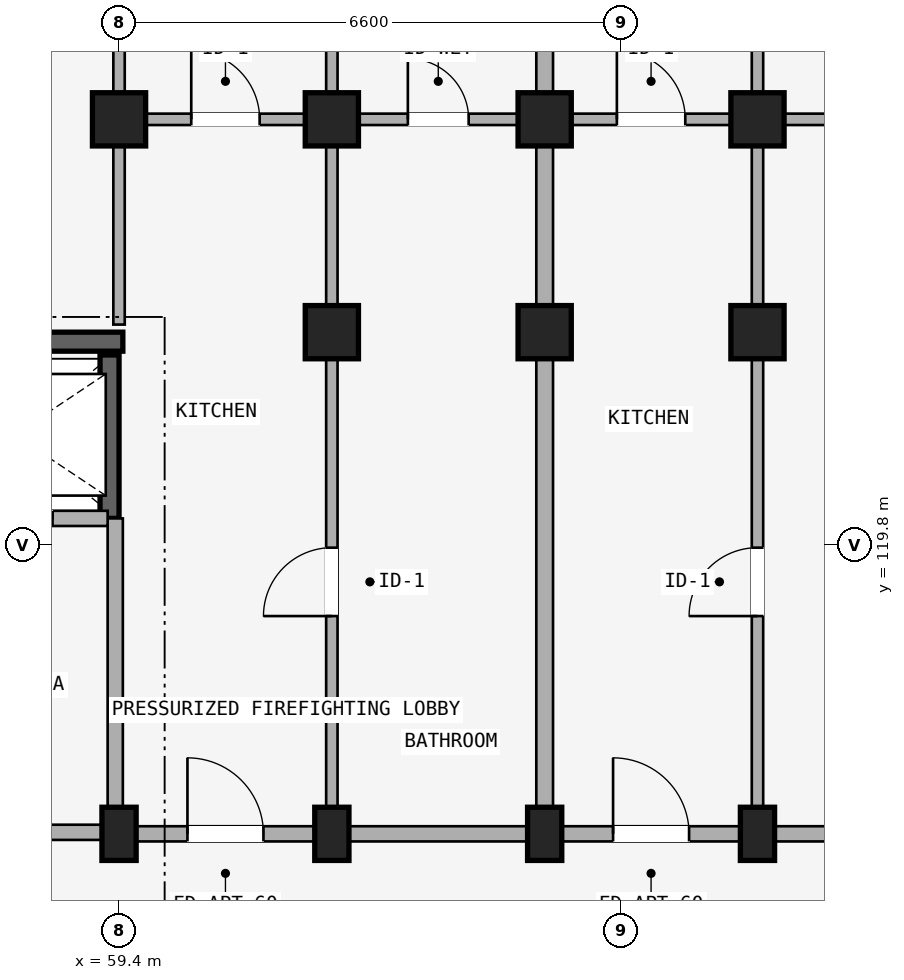
"""IFC4 building model, lengths in metres.
Left out: names, types, materials, properties, quantities, classifications, styles, units other than length and angle.
Written with IfcOpenShell. Run it as: python <this file> out.ifc"""

import sys

from ifc_helpers import new_model, si_unit, direction, frame, frame_2d, origin, origin_2d, place, context, subcontext, project, spatial, rectangle, extrude, element, fill, save


model = new_model("IFC4")
c1 = context("Model", 3, precision=1e-05, world=origin(), true_north=direction((0.0, 1.0)))
c2 = subcontext(c1, "Body", "Model", "MODEL_VIEW")
j1 = project(units=[si_unit("LENGTHUNIT", "METRE"), si_unit("PLANEANGLEUNIT", "RADIAN")], contexts=[c1])
p1 = place(None, origin())
s1 = spatial("IfcSite", under=j1, at=p1, CompositionType="ELEMENT")
p2 = place(p1, origin())
s2 = spatial("IfcBuilding", under=s1, at=p2, CompositionType="ELEMENT")
p3 = place(p2, frame((0.0, 0.0, 24.45)))
s3 = spatial("IfcBuildingStorey", under=s2, at=p3, CompositionType="ELEMENT", Elevation=24.45)
p4 = place(p3, frame((56.65, 122.475, 0.0), z_axis=(0.0, 0.0, 1.0), x_axis=(1.0, 0.0, 0.0)))
e1 = element("IfcWall", 1, at=p4, inside=s3, PredefinedType="SHEAR", context=c2, shape_type="SweptSolid", body=[
    extrude(rectangle(XDim=2.8, YDim=0.25, at=frame_2d((1.4, 0.0))), origin(), (0.0, 0.0, 1.0), 2.93),
])
p5 = place(p3, frame((59.275, 120.15, 0.0), z_axis=(0.0, 0.0, 1.0), x_axis=(0.0, 1.0, 0.0)))
e2 = element("IfcWall", 2, at=p5, inside=s3, PredefinedType="SHEAR", context=c2, shape_type="SweptSolid", body=[
    extrude(rectangle(XDim=2.15, YDim=0.25, at=frame_2d((1.075, 0.0))), origin(), (0.0, 0.0, 1.0), 2.93),
])
p6 = place(p3, frame((59.4, 116.0, 0.0), z_axis=(0.0, 0.0, 1.0), x_axis=(1.0, 0.0, 0.0)))
e3 = element("IfcColumn", 3, at=p6, inside=s3, PredefinedType="COLUMN", context=c2, shape_type="SweptSolid", body=[
    extrude(rectangle(XDim=0.45, YDim=0.7, at=origin_2d()), origin(), (0.0, 0.0, 1.0), 2.93),
])
p7 = place(p3, frame((59.4, 125.4, 0.0), z_axis=(0.0, 0.0, 1.0), x_axis=(1.0, 0.0, 0.0)))
e4 = element("IfcColumn", 4, at=p7, inside=s3, PredefinedType="COLUMN", context=c2, shape_type="SweptSolid", body=[
    extrude(rectangle(XDim=0.7, YDim=0.7, at=origin_2d()), origin(), (0.0, 0.0, 1.0), 2.93),
])
p8 = place(p3, frame((62.2, 116.0, 0.0), z_axis=(0.0, 0.0, 1.0), x_axis=(1.0, 0.0, 0.0)))
e5 = element("IfcColumn", 5, at=p8, inside=s3, PredefinedType="COLUMN", context=c2, shape_type="SweptSolid", body=[
    extrude(rectangle(XDim=0.45, YDim=0.7, at=origin_2d()), origin(), (0.0, 0.0, 1.0), 2.93),
])
for number, where, z_axis, x_axis in (
    (6, (62.2, 122.6, 0.0), (0.0, 0.0, 1.0), (1.0, 0.0, 0.0)),
    (7, (62.2, 125.4, 0.0), (0.0, 0.0, 1.0), (1.0, 0.0, 0.0)),
):
    element("IfcColumn", number, at=place(p3, frame(where, z_axis=z_axis, x_axis=x_axis)), inside=s3, PredefinedType="COLUMN", context=c2, shape_type="SweptSolid", body=[
        extrude(rectangle(XDim=0.7, YDim=0.7, at=origin_2d()), origin(), (0.0, 0.0, 1.0), 2.93),
    ])
p9 = place(p3, frame((65.0, 116.0, 0.0), z_axis=(0.0, 0.0, 1.0), x_axis=(1.0, 0.0, 0.0)))
e8 = element("IfcColumn", 8, at=p9, inside=s3, PredefinedType="COLUMN", context=c2, shape_type="SweptSolid", body=[
    extrude(rectangle(XDim=0.45, YDim=0.7, at=origin_2d()), origin(), (0.0, 0.0, 1.0), 2.93),
])
for number, where, z_axis, x_axis in (
    (9, (65.0, 122.6, 0.0), (0.0, 0.0, 1.0), (1.0, 0.0, 0.0)),
    (10, (65.0, 125.4, 0.0), (0.0, 0.0, 1.0), (1.0, 0.0, 0.0)),
):
    element("IfcColumn", number, at=place(p3, frame(where, z_axis=z_axis, x_axis=x_axis)), inside=s3, PredefinedType="COLUMN", context=c2, shape_type="SweptSolid", body=[
        extrude(rectangle(XDim=0.7, YDim=0.7, at=origin_2d()), origin(), (0.0, 0.0, 1.0), 2.93),
    ])
p10 = place(p3, frame((67.8, 116.0, 0.0), z_axis=(0.0, 0.0, 1.0), x_axis=(1.0, 0.0, 0.0)))
e11 = element("IfcColumn", 11, at=p10, inside=s3, PredefinedType="COLUMN", context=c2, shape_type="SweptSolid", body=[
    extrude(rectangle(XDim=0.45, YDim=0.7, at=origin_2d()), origin(), (0.0, 0.0, 1.0), 2.93),
])
for number, where, z_axis, x_axis in (
    (12, (67.8, 122.6, 0.0), (0.0, 0.0, 1.0), (1.0, 0.0, 0.0)),
    (13, (67.8, 125.4, 0.0), (0.0, 0.0, 1.0), (1.0, 0.0, 0.0)),
):
    element("IfcColumn", number, at=place(p3, frame(where, z_axis=z_axis, x_axis=x_axis)), inside=s3, PredefinedType="COLUMN", context=c2, shape_type="SweptSolid", body=[
        extrude(rectangle(XDim=0.7, YDim=0.7, at=origin_2d()), origin(), (0.0, 0.0, 1.0), 2.93),
    ])
p11 = place(p3, frame((53.7, 116.02, 0.0), z_axis=(0.0, 0.0, 1.0), x_axis=(1.0, 0.0, 0.0)))
e14 = element("IfcWall", 14, at=p11, inside=s3, PredefinedType="STANDARD", context=c2, shape_type="SweptSolid", body=[
    extrude(rectangle(XDim=5.65, YDim=0.2, at=frame_2d((2.825, 0.0))), origin(), (0.0, 0.0, 1.0), 2.372),
])
p12 = place(p11, frame((1.923, 0.0, 0.0)))
e15 = element("IfcOpeningElement", 15, at=p12, cuts=e14, PredefinedType="OPENING", context=c2, shape_type="SweptSolid", body=[
    extrude(rectangle(XDim=1.24, YDim=2.15, at=frame_2d((0.62, 1.075))), frame((0.0, 0.11, 0.0), z_axis=(0.0, -1.0, 0.0), x_axis=(1.0, 0.0, 0.0)), (0.0, 0.0, 1.0), 0.22),
])
p13 = place(p3, frame((59.35, 116.02, 0.0), z_axis=(0.0, 0.0, 1.0), x_axis=(0.0, 1.0, 0.0)))
e16 = element("IfcWall", 16, at=p13, inside=s3, PredefinedType="STANDARD", context=c2, shape_type="SweptSolid", body=[
    extrude(rectangle(XDim=4.13, YDim=0.2, at=frame_2d((2.065, 0.0))), origin(), (0.0, 0.0, 1.0), 2.372),
])
p14 = place(p3, frame((56.7, 120.15, 0.0), z_axis=(0.0, 0.0, 1.0), x_axis=(1.0, 0.0, 0.0)))
e17 = element("IfcWall", 17, at=p14, inside=s3, PredefinedType="STANDARD", context=c2, shape_type="SweptSolid", body=[
    extrude(rectangle(XDim=2.55, YDim=0.2, at=frame_2d((1.275, 0.0))), origin(), (0.0, 0.0, 1.0), 2.372),
])
p15 = place(p14, frame((0.725, 0.0, 0.0)))
e18 = element("IfcOpeningElement", 18, at=p15, cuts=e17, PredefinedType="OPENING", context=c2, shape_type="SweptSolid", body=[
    extrude(rectangle(XDim=1.1, YDim=2.15, at=frame_2d((0.55, 1.075))), frame((0.0, 0.11, 0.0), z_axis=(0.0, -1.0, 0.0), x_axis=(1.0, 0.0, 0.0)), (0.0, 0.0, 1.0), 0.22),
])
p16 = place(p3, frame((59.4, 116.0, 0.0), z_axis=(0.0, 0.0, 1.0), x_axis=(1.0, 0.0, 0.0)))
e19 = element("IfcWall", 19, at=p16, inside=s3, PredefinedType="STANDARD", context=c2, shape_type="SweptSolid", body=[
    extrude(rectangle(XDim=2.8, YDim=0.2, at=frame_2d((1.4, 0.0))), origin(), (0.0, 0.0, 1.0), 2.372),
])
p17 = place(p16, frame((0.9, 0.0, 0.0)))
e20 = element("IfcOpeningElement", 20, at=p17, cuts=e19, PredefinedType="OPENING", context=c2, shape_type="SweptSolid", body=[
    extrude(rectangle(XDim=1.0, YDim=2.15, at=frame_2d((0.5, 1.075))), frame((0.0, 0.11, 0.0), z_axis=(0.0, -1.0, 0.0), x_axis=(1.0, 0.0, 0.0)), (0.0, 0.0, 1.0), 0.22),
])
p18 = place(p3, frame((59.48, 125.4, 0.0), z_axis=(0.0, 0.0, 1.0), x_axis=(1.0, 0.0, 0.0)))
e21 = element("IfcWall", 21, at=p18, inside=s3, PredefinedType="PLUMBINGWALL", context=c2, shape_type="SweptSolid", body=[
    extrude(rectangle(XDim=2.64, YDim=0.15, at=frame_2d((1.32, 0.0))), origin(), (0.0, 0.0, 1.0), 2.372),
])
p19 = place(p18, frame((0.87, 0.0, 0.0)))
e22 = element("IfcOpeningElement", 22, at=p19, cuts=e21, PredefinedType="OPENING", context=c2, shape_type="SweptSolid", body=[
    extrude(rectangle(XDim=0.9, YDim=2.1, at=frame_2d((0.45, 1.05))), frame((0.0, 0.085, 0.0), z_axis=(0.0, -1.0, 0.0), x_axis=(1.0, 0.0, 0.0)), (0.0, 0.0, 1.0), 0.17),
])
p20 = place(p3, frame((62.2, 116.0, 0.0), z_axis=(0.0, 0.0, 1.0), x_axis=(1.0, 0.0, 0.0)))
e23 = element("IfcWall", 23, at=p20, inside=s3, PredefinedType="STANDARD", context=c2, shape_type="SweptSolid", body=[
    extrude(rectangle(XDim=2.8, YDim=0.2, at=frame_2d((1.4, 0.0))), origin(), (0.0, 0.0, 1.0), 2.372),
])
p21 = place(p3, frame((62.28, 125.4, 0.0), z_axis=(0.0, 0.0, 1.0), x_axis=(1.0, 0.0, 0.0)))
e24 = element("IfcWall", 24, at=p21, inside=s3, PredefinedType="PLUMBINGWALL", context=c2, shape_type="SweptSolid", body=[
    extrude(rectangle(XDim=2.64, YDim=0.15, at=frame_2d((1.32, 0.0))), origin(), (0.0, 0.0, 1.0), 2.372),
])
p22 = place(p21, frame((0.92, 0.0, 0.0)))
e25 = element("IfcOpeningElement", 25, at=p22, cuts=e24, PredefinedType="OPENING", context=c2, shape_type="SweptSolid", body=[
    extrude(rectangle(XDim=0.8, YDim=2.1, at=frame_2d((0.4, 1.05))), frame((0.0, 0.085, 0.0), z_axis=(0.0, -1.0, 0.0), x_axis=(1.0, 0.0, 0.0)), (0.0, 0.0, 1.0), 0.17),
])
p23 = place(p3, frame((65.0, 116.0, 0.0), z_axis=(0.0, 0.0, 1.0), x_axis=(1.0, 0.0, 0.0)))
e26 = element("IfcWall", 26, at=p23, inside=s3, PredefinedType="STANDARD", context=c2, shape_type="SweptSolid", body=[
    extrude(rectangle(XDim=2.8, YDim=0.2, at=frame_2d((1.4, 0.0))), origin(), (0.0, 0.0, 1.0), 2.372),
])
p24 = place(p23, frame((0.9, 0.0, 0.0)))
e27 = element("IfcOpeningElement", 27, at=p24, cuts=e26, PredefinedType="OPENING", context=c2, shape_type="SweptSolid", body=[
    extrude(rectangle(XDim=1.0, YDim=2.15, at=frame_2d((0.5, 1.075))), frame((0.0, 0.11, 0.0), z_axis=(0.0, -1.0, 0.0), x_axis=(1.0, 0.0, 0.0)), (0.0, 0.0, 1.0), 0.22),
])
p25 = place(p3, frame((65.08, 125.4, 0.0), z_axis=(0.0, 0.0, 1.0), x_axis=(1.0, 0.0, 0.0)))
e28 = element("IfcWall", 28, at=p25, inside=s3, PredefinedType="PLUMBINGWALL", context=c2, shape_type="SweptSolid", body=[
    extrude(rectangle(XDim=2.64, YDim=0.15, at=frame_2d((1.32, 0.0))), origin(), (0.0, 0.0, 1.0), 2.372),
])
p26 = place(p25, frame((0.87, 0.0, 0.0)))
e29 = element("IfcOpeningElement", 29, at=p26, cuts=e28, PredefinedType="OPENING", context=c2, shape_type="SweptSolid", body=[
    extrude(rectangle(XDim=0.9, YDim=2.1, at=frame_2d((0.45, 1.05))), frame((0.0, 0.085, 0.0), z_axis=(0.0, -1.0, 0.0), x_axis=(1.0, 0.0, 0.0)), (0.0, 0.0, 1.0), 0.17),
])
p27 = place(p3, frame((67.8, 116.0, 0.0), z_axis=(0.0, 0.0, 1.0), x_axis=(1.0, 0.0, 0.0)))
e30 = element("IfcWall", 30, at=p27, inside=s3, PredefinedType="STANDARD", context=c2, shape_type="SweptSolid", body=[
    extrude(rectangle(XDim=2.8, YDim=0.2, at=frame_2d((1.4, 0.0))), origin(), (0.0, 0.0, 1.0), 2.372),
])
p28 = place(p3, frame((67.88, 125.4, 0.0), z_axis=(0.0, 0.0, 1.0), x_axis=(1.0, 0.0, 0.0)))
e31 = element("IfcWall", 31, at=p28, inside=s3, PredefinedType="PLUMBINGWALL", context=c2, shape_type="SweptSolid", body=[
    extrude(rectangle(XDim=2.64, YDim=0.15, at=frame_2d((1.32, 0.0))), origin(), (0.0, 0.0, 1.0), 2.372),
])
p29 = place(p28, frame((0.92, 0.0, 0.0)))
e32 = element("IfcOpeningElement", 32, at=p29, cuts=e31, PredefinedType="OPENING", context=c2, shape_type="SweptSolid", body=[
    extrude(rectangle(XDim=0.8, YDim=2.1, at=frame_2d((0.4, 1.05))), frame((0.0, 0.085, 0.0), z_axis=(0.0, -1.0, 0.0), x_axis=(1.0, 0.0, 0.0)), (0.0, 0.0, 1.0), 0.17),
])
p30 = place(p3, frame((59.4, 122.7, 0.0), z_axis=(0.0, 0.0, 1.0), x_axis=(0.0, 1.0, 0.0)))
e33 = element("IfcWall", 33, at=p30, inside=s3, PredefinedType="PARTITIONING", context=c2, shape_type="SweptSolid", body=[
    extrude(rectangle(XDim=10.82, YDim=0.15, at=frame_2d((5.41, 0.0))), origin(), (0.0, 0.0, 1.0), 2.372),
])
p31 = place(p30, frame((3.7, 0.0, 0.0)))
e34 = element("IfcOpeningElement", 34, at=p31, cuts=e33, PredefinedType="OPENING", context=c2, shape_type="SweptSolid", body=[
    extrude(rectangle(XDim=0.8, YDim=2.1, at=frame_2d((0.4, 1.05))), frame((0.0, 0.085, 0.0), z_axis=(0.0, -1.0, 0.0), x_axis=(1.0, 0.0, 0.0)), (0.0, 0.0, 1.0), 0.17),
])
p32 = place(p3, frame((62.2, 116.05, 0.0), z_axis=(0.0, 0.0, 1.0), x_axis=(0.0, 1.0, 0.0)))
e35 = element("IfcWall", 35, at=p32, inside=s3, PredefinedType="PARTITIONING", context=c2, shape_type="SweptSolid", body=[
    extrude(rectangle(XDim=6.53, YDim=0.15, at=frame_2d((3.265, 0.0))), origin(), (0.0, 0.0, 1.0), 2.372),
])
p33 = place(p32, frame((2.815, 0.0, 0.0)))
e36 = element("IfcOpeningElement", 36, at=p33, cuts=e35, PredefinedType="OPENING", context=c2, shape_type="SweptSolid", body=[
    extrude(rectangle(XDim=0.9, YDim=2.1, at=frame_2d((0.45, 1.05))), frame((0.0, 0.085, 0.0), z_axis=(0.0, -1.0, 0.0), x_axis=(1.0, 0.0, 0.0)), (0.0, 0.0, 1.0), 0.17),
])
p34 = place(p3, frame((62.2, 122.7, 0.0), z_axis=(0.0, 0.0, 1.0), x_axis=(0.0, 1.0, 0.0)))
e37 = element("IfcWall", 37, at=p34, inside=s3, PredefinedType="PARTITIONING", context=c2, shape_type="SweptSolid", body=[
    extrude(rectangle(XDim=10.82, YDim=0.15, at=frame_2d((5.41, 0.0))), origin(), (0.0, 0.0, 1.0), 2.372),
])
p35 = place(p34, frame((3.7, 0.0, 0.0)))
e38 = element("IfcOpeningElement", 38, at=p35, cuts=e37, PredefinedType="OPENING", context=c2, shape_type="SweptSolid", body=[
    extrude(rectangle(XDim=0.8, YDim=2.1, at=frame_2d((0.4, 1.05))), frame((0.0, 0.085, 0.0), z_axis=(0.0, -1.0, 0.0), x_axis=(1.0, 0.0, 0.0)), (0.0, 0.0, 1.0), 0.17),
])
p36 = place(p3, frame((65.0, 116.05, 0.0), z_axis=(0.0, 0.0, 1.0), x_axis=(0.0, 1.0, 0.0)))
e39 = element("IfcWall", 39, at=p36, inside=s3, PredefinedType="STANDARD", context=c2, shape_type="SweptSolid", body=[
    extrude(rectangle(XDim=6.53, YDim=0.22, at=frame_2d((3.265, 0.0))), origin(), (0.0, 0.0, 1.0), 2.372),
])
p37 = place(p3, frame((65.0, 122.7, 0.0), z_axis=(0.0, 0.0, 1.0), x_axis=(0.0, 1.0, 0.0)))
e40 = element("IfcWall", 40, at=p37, inside=s3, PredefinedType="STANDARD", context=c2, shape_type="SweptSolid", body=[
    extrude(rectangle(XDim=10.82, YDim=0.22, at=frame_2d((5.41, 0.0))), origin(), (0.0, 0.0, 1.0), 2.372),
])
p38 = place(p3, frame((67.8, 116.05, 0.0), z_axis=(0.0, 0.0, 1.0), x_axis=(0.0, 1.0, 0.0)))
e41 = element("IfcWall", 41, at=p38, inside=s3, PredefinedType="PARTITIONING", context=c2, shape_type="SweptSolid", body=[
    extrude(rectangle(XDim=6.53, YDim=0.15, at=frame_2d((3.265, 0.0))), origin(), (0.0, 0.0, 1.0), 2.372),
])
p39 = place(p38, frame((2.815, 0.0, 0.0)))
e42 = element("IfcOpeningElement", 42, at=p39, cuts=e41, PredefinedType="OPENING", context=c2, shape_type="SweptSolid", body=[
    extrude(rectangle(XDim=0.9, YDim=2.1, at=frame_2d((0.45, 1.05))), frame((0.0, 0.085, 0.0), z_axis=(0.0, -1.0, 0.0), x_axis=(1.0, 0.0, 0.0)), (0.0, 0.0, 1.0), 0.17),
])
p40 = place(p3, frame((67.8, 122.7, 0.0), z_axis=(0.0, 0.0, 1.0), x_axis=(0.0, 1.0, 0.0)))
e43 = element("IfcWall", 43, at=p40, inside=s3, PredefinedType="PARTITIONING", context=c2, shape_type="SweptSolid", body=[
    extrude(rectangle(XDim=10.82, YDim=0.15, at=frame_2d((5.41, 0.0))), origin(), (0.0, 0.0, 1.0), 2.372),
])
p41 = place(p40, frame((3.7, 0.0, 0.0)))
e44 = element("IfcOpeningElement", 44, at=p41, cuts=e43, PredefinedType="OPENING", context=c2, shape_type="SweptSolid", body=[
    extrude(rectangle(XDim=0.8, YDim=2.1, at=frame_2d((0.4, 1.05))), frame((0.0, 0.085, 0.0), z_axis=(0.0, -1.0, 0.0), x_axis=(1.0, 0.0, 0.0)), (0.0, 0.0, 1.0), 0.17),
])
p42 = place(p15, origin())
e45 = element("IfcDoor", 45, at=p42, inside=s3, OperationType="SLIDING_TO_LEFT", PredefinedType="DOOR", context=c2, shape_type="SweptSolid", body=[
    extrude(rectangle(XDim=1.1, YDim=2.15, at=frame_2d((0.55, 1.075))), frame((0.0, 0.025, 0.0), z_axis=(0.0, -1.0, 0.0), x_axis=(1.0, 0.0, 0.0)), (0.0, 0.0, 1.0), 0.05),
])
fill(e18, e45)
p43 = place(p19, frame((0.9, 0.0, 0.0), z_axis=(0.0, 0.0, 1.0), x_axis=(-1.0, 0.0, 0.0)))
e46 = element("IfcDoor", 46, at=p43, inside=s3, OperationType="SINGLE_SWING_RIGHT", PredefinedType="DOOR", context=c2, shape_type="SweptSolid", body=[
    extrude(rectangle(XDim=0.9, YDim=2.1, at=frame_2d((0.45, 1.05))), frame((0.0, 0.025, 0.0), z_axis=(0.0, -1.0, 0.0), x_axis=(1.0, 0.0, 0.0)), (0.0, 0.0, 1.0), 0.05),
])
fill(e22, e46)
p44 = place(p17, origin())
e47 = element("IfcDoor", 47, at=p44, inside=s3, OperationType="SINGLE_SWING_LEFT", PredefinedType="DOOR", context=c2, shape_type="SweptSolid", body=[
    extrude(rectangle(XDim=1.0, YDim=2.15, at=frame_2d((0.5, 1.075))), frame((0.0, 0.025, 0.0), z_axis=(0.0, -1.0, 0.0), x_axis=(1.0, 0.0, 0.0)), (0.0, 0.0, 1.0), 0.05),
])
fill(e20, e47)
p45 = place(p22, frame((0.8, 0.0, 0.0), z_axis=(0.0, 0.0, 1.0), x_axis=(-1.0, 0.0, 0.0)))
e48 = element("IfcDoor", 48, at=p45, inside=s3, OperationType="SINGLE_SWING_RIGHT", PredefinedType="DOOR", context=c2, shape_type="SweptSolid", body=[
    extrude(rectangle(XDim=0.8, YDim=2.1, at=frame_2d((0.4, 1.05))), frame((0.0, 0.025, 0.0), z_axis=(0.0, -1.0, 0.0), x_axis=(1.0, 0.0, 0.0)), (0.0, 0.0, 1.0), 0.05),
])
fill(e25, e48)
p46 = place(p26, frame((0.9, 0.0, 0.0), z_axis=(0.0, 0.0, 1.0), x_axis=(-1.0, 0.0, 0.0)))
e49 = element("IfcDoor", 49, at=p46, inside=s3, OperationType="SINGLE_SWING_RIGHT", PredefinedType="DOOR", context=c2, shape_type="SweptSolid", body=[
    extrude(rectangle(XDim=0.9, YDim=2.1, at=frame_2d((0.45, 1.05))), frame((0.0, 0.025, 0.0), z_axis=(0.0, -1.0, 0.0), x_axis=(1.0, 0.0, 0.0)), (0.0, 0.0, 1.0), 0.05),
])
fill(e29, e49)
p47 = place(p24, origin())
e50 = element("IfcDoor", 50, at=p47, inside=s3, OperationType="SINGLE_SWING_LEFT", PredefinedType="DOOR", context=c2, shape_type="SweptSolid", body=[
    extrude(rectangle(XDim=1.0, YDim=2.15, at=frame_2d((0.5, 1.075))), frame((0.0, 0.025, 0.0), z_axis=(0.0, -1.0, 0.0), x_axis=(1.0, 0.0, 0.0)), (0.0, 0.0, 1.0), 0.05),
])
fill(e27, e50)
p48 = place(p33, origin())
e51 = element("IfcDoor", 51, at=p48, inside=s3, OperationType="SINGLE_SWING_LEFT", PredefinedType="DOOR", context=c2, shape_type="SweptSolid", body=[
    extrude(rectangle(XDim=0.9, YDim=2.1, at=frame_2d((0.45, 1.05))), frame((0.0, 0.025, 0.0), z_axis=(0.0, -1.0, 0.0), x_axis=(1.0, 0.0, 0.0)), (0.0, 0.0, 1.0), 0.05),
])
fill(e36, e51)
p49 = place(p39, frame((0.9, 0.0, 0.0), z_axis=(0.0, 0.0, 1.0), x_axis=(-1.0, 0.0, 0.0)))
e52 = element("IfcDoor", 52, at=p49, inside=s3, OperationType="SINGLE_SWING_RIGHT", PredefinedType="DOOR", context=c2, shape_type="SweptSolid", body=[
    extrude(rectangle(XDim=0.9, YDim=2.1, at=frame_2d((0.45, 1.05))), frame((0.0, 0.025, 0.0), z_axis=(0.0, -1.0, 0.0), x_axis=(1.0, 0.0, 0.0)), (0.0, 0.0, 1.0), 0.05),
])
fill(e42, e52)
save(model, sys.argv[1])
